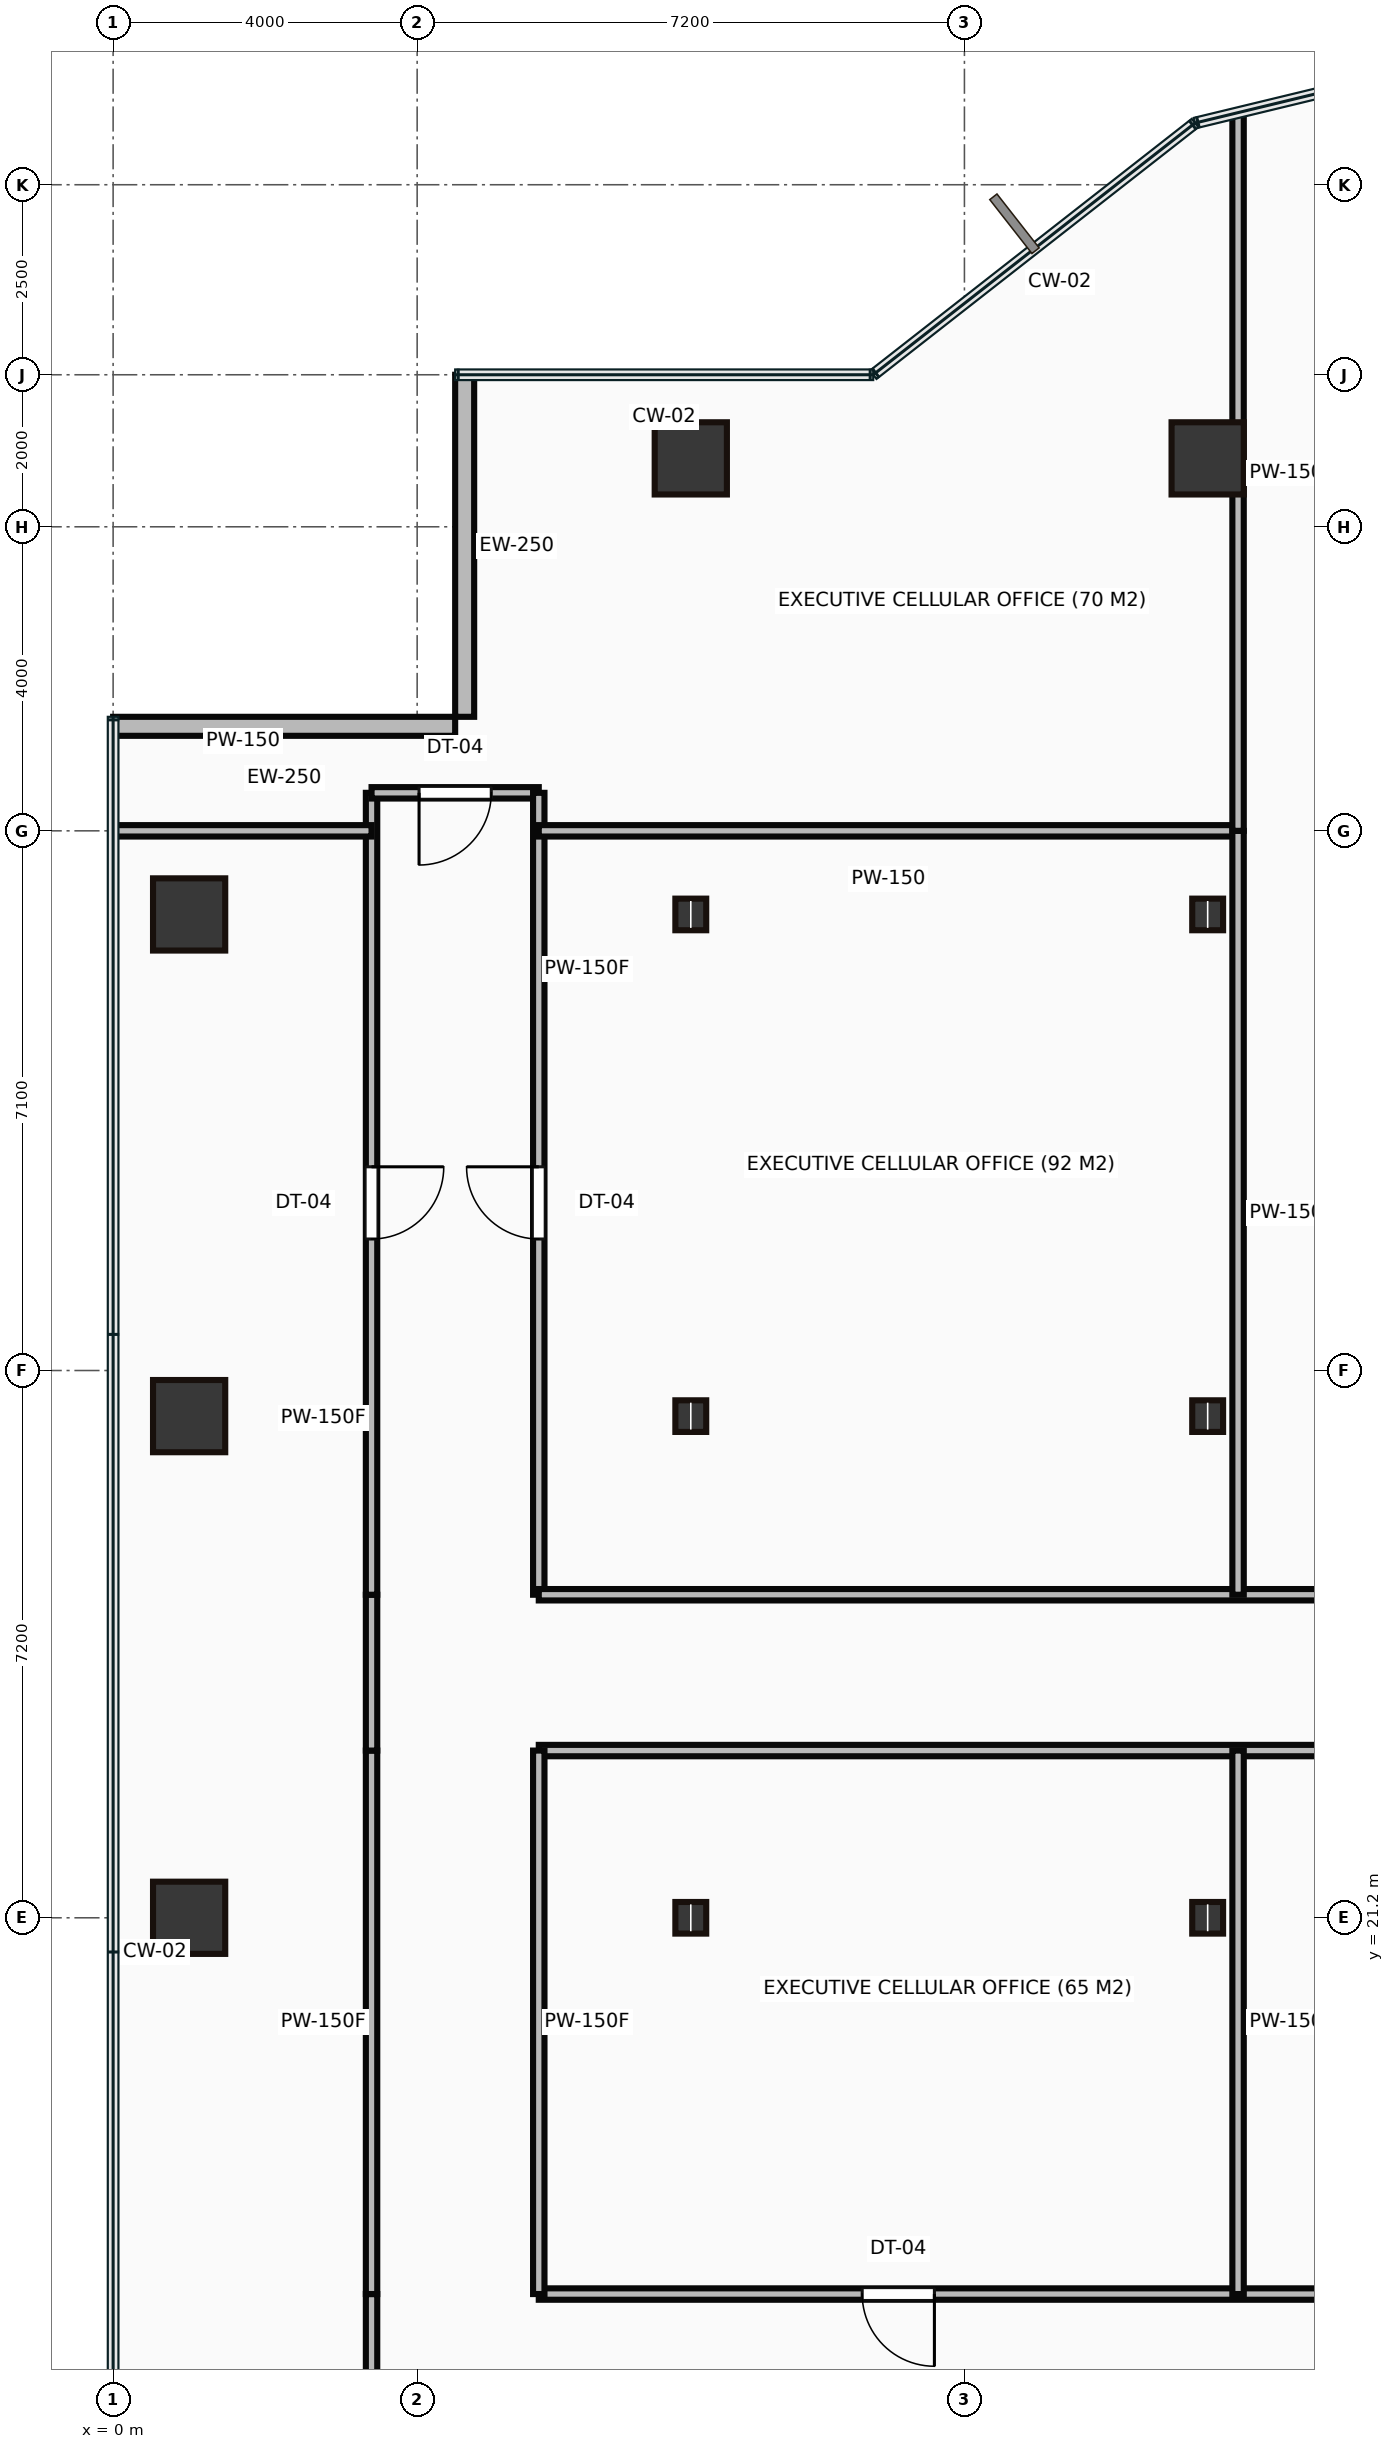
"""IFC4 building model, lengths in metres.
Left out: names, types, materials, properties, quantities, classifications, styles, units other than length and angle.
Written with IfcOpenShell. Run it as: python <this file> out.ifc"""

import sys

from ifc_helpers import new_model, si_unit, direction, frame, frame_2d, origin, origin_2d, place, context, subcontext, project, spatial, rectangle, hollow_rectangle, i_section, extrude, source, transform, mapped, element, fill, save


model = new_model("IFC4")
c1 = context("Model", 3, precision=1e-05, world=origin(), true_north=direction((0.0, 1.0)))
c2 = subcontext(c1, "Body", "Model", "MODEL_VIEW")
j1 = project(units=[si_unit("LENGTHUNIT", "METRE"), si_unit("PLANEANGLEUNIT", "RADIAN")], contexts=[c1])
p1 = place(None, origin())
s1 = spatial("IfcSite", under=j1, at=p1, CompositionType="ELEMENT")
p2 = place(p1, origin())
s2 = spatial("IfcBuilding", under=s1, at=p2, CompositionType="ELEMENT")
p3 = place(p2, frame((0.0, 0.0, 69.0)))
s3 = spatial("IfcBuildingStorey", under=s2, at=p3, CompositionType="ELEMENT", Elevation=69.0)
m1 = source(origin(), c2, "Body", "SweptSolid", [
    extrude(hollow_rectangle(XDim=0.95, YDim=0.95, WallThickness=0.045, at=origin_2d()), origin(), (0.0, 0.0, 1.0), 3.65),
])
for number, where, z_axis, x_axis in (
    (1, (1.0, 21.2, 0.0), (0.0, 0.0, 1.0), (1.0, 0.0, 0.0)),
    (2, (1.0, 27.8, 0.0), (0.0, 0.0, 1.0), (1.0, 0.0, 0.0)),
    (3, (1.0, 34.4, 0.0), (0.0, 0.0, 1.0), (1.0, 0.0, 0.0)),
):
    element("IfcColumn", number, at=place(p3, frame(where, z_axis=z_axis, x_axis=x_axis)), inside=s3, PredefinedType="COLUMN", context=c2, shape_type="MappedRepresentation", body=[
        mapped(m1, transform((0.0, 0.0, 0.0))),
    ])
m2 = source(origin(), c2, "Body", "SweptSolid", [
    extrude(i_section(OverallWidth=0.406, OverallDepth=0.416, WebThickness=0.03, FlangeThickness=0.048, at=origin_2d()), origin(), (0.0, 0.0, 1.0), 3.65),
])
for number, where, z_axis, x_axis in (
    (4, (7.6, 21.2, 0.0), (0.0, 0.0, 1.0), (1.0, 0.0, 0.0)),
    (5, (7.6, 27.8, 0.0), (0.0, 0.0, 1.0), (1.0, 0.0, 0.0)),
    (6, (7.6, 34.4, 0.0), (0.0, 0.0, 1.0), (1.0, 0.0, 0.0)),
):
    element("IfcColumn", number, at=place(p3, frame(where, z_axis=z_axis, x_axis=x_axis)), inside=s3, PredefinedType="COLUMN", context=c2, shape_type="MappedRepresentation", body=[
        mapped(m2, transform((0.0, 0.0, 0.0))),
    ])
p4 = place(p3, frame((7.6, 40.4, 0.0), z_axis=(0.0, 0.0, 1.0), x_axis=(1.0, 0.0, 0.0)))
e7 = element("IfcColumn", 7, at=p4, inside=s3, PredefinedType="COLUMN", context=c2, shape_type="MappedRepresentation", body=[
    mapped(m1, transform((0.0, 0.0, 0.0))),
])
for number, where, z_axis, x_axis in (
    (8, (14.4, 21.2, 0.0), (0.0, 0.0, 1.0), (1.0, 0.0, 0.0)),
    (9, (14.4, 27.8, 0.0), (0.0, 0.0, 1.0), (1.0, 0.0, 0.0)),
    (10, (14.4, 34.4, 0.0), (0.0, 0.0, 1.0), (1.0, 0.0, 0.0)),
):
    element("IfcColumn", number, at=place(p3, frame(where, z_axis=z_axis, x_axis=x_axis)), inside=s3, PredefinedType="COLUMN", context=c2, shape_type="MappedRepresentation", body=[
        mapped(m2, transform((0.0, 0.0, 0.0))),
    ])
p5 = place(p3, frame((14.4, 40.4, 0.0), z_axis=(0.0, 0.0, 1.0), x_axis=(1.0, 0.0, 0.0)))
e11 = element("IfcColumn", 11, at=p5, inside=s3, PredefinedType="COLUMN", context=c2, shape_type="MappedRepresentation", body=[
    mapped(m1, transform((0.0, 0.0, 0.0))),
])
m3 = source(origin(), c2, "Body", "SweptSolid", [
    extrude(rectangle(XDim=4.5, YDim=0.25, at=frame_2d((2.25, 0.0))), origin(), (0.0, 0.0, 1.0), 3.4),
])
for number, where, z_axis, x_axis in (
    (12, (4.625, 41.5, 0.0), (0.0, 0.0, 1.0), (0.0, -1.0, 0.0)),
    (13, (4.5, 36.875, 0.0), (0.0, 0.0, 1.0), (-1.0, 0.0, 0.0)),
):
    element("IfcWall", number, at=place(p3, frame(where, z_axis=z_axis, x_axis=x_axis)), inside=s3, PredefinedType="STANDARD", context=c2, shape_type="MappedRepresentation", body=[
        mapped(m3, transform((0.0, 0.0, 0.0))),
    ])
m4 = source(origin(), c2, "Body", "SweptSolid", [
    extrude(rectangle(XDim=2.25, YDim=0.15, at=frame_2d((1.125, 0.0))), origin(), (0.0, 0.0, 1.0), 3.4),
])
p6 = place(p3, frame((3.4, 14.0, 0.0), z_axis=(0.0, 0.0, 1.0), x_axis=(0.0, 1.0, 0.0)))
e14 = element("IfcWall", 14, at=p6, inside=s3, PredefinedType="PARTITIONING", context=c2, shape_type="MappedRepresentation", body=[
    mapped(m4, transform((0.0, 0.0, 0.0))),
])
m5 = source(origin(), c2, "Body", "SweptSolid", [
    extrude(rectangle(XDim=7.15, YDim=0.15, at=frame_2d((3.575, 0.0))), origin(), (0.0, 0.0, 1.0), 3.4),
])
p7 = place(p3, frame((3.4, 16.25, 0.0), z_axis=(0.0, 0.0, 1.0), x_axis=(0.0, 1.0, 0.0)))
e15 = element("IfcWall", 15, at=p7, inside=s3, PredefinedType="PARTITIONING", context=c2, shape_type="MappedRepresentation", body=[
    mapped(m5, transform((0.0, 0.0, 0.0))),
])
m6 = source(origin(), c2, "Body", "SweptSolid", [
    extrude(rectangle(XDim=2.05, YDim=0.15, at=frame_2d((1.025, 0.0))), origin(), (0.0, 0.0, 1.0), 3.4),
])
p8 = place(p3, frame((3.4, 23.4, 0.0), z_axis=(0.0, 0.0, 1.0), x_axis=(0.0, 1.0, 0.0)))
e16 = element("IfcWall", 16, at=p8, inside=s3, PredefinedType="PARTITIONING", context=c2, shape_type="MappedRepresentation", body=[
    mapped(m6, transform((0.0, 0.0, 0.0))),
])
m7 = source(origin(), c2, "Body", "SweptSolid", [
    extrude(rectangle(XDim=10.55, YDim=0.15, at=frame_2d((5.275, 0.0))), origin(), (0.0, 0.0, 1.0), 3.4),
])
p9 = place(p3, frame((3.4, 25.45, 0.0), z_axis=(0.0, 0.0, 1.0), x_axis=(0.0, 1.0, 0.0)))
e17 = element("IfcWall", 17, at=p9, inside=s3, PredefinedType="PARTITIONING", context=c2, shape_type="MappedRepresentation", body=[
    mapped(m7, transform((0.0, 0.0, 0.0))),
])
p10 = place(p9, frame((4.68, 0.0, 0.0)))
e18 = element("IfcOpeningElement", 18, at=p10, cuts=e17, PredefinedType="OPENING", context=c2, shape_type="SweptSolid", body=[
    extrude(rectangle(XDim=0.95, YDim=2.15, at=frame_2d((0.475, 1.075))), frame((0.0, 0.085, 0.0), z_axis=(0.0, -1.0, 0.0), x_axis=(1.0, 0.0, 0.0)), (0.0, 0.0, 1.0), 0.17),
])
m8 = source(origin(), c2, "Body", "SweptSolid", [
    extrude(rectangle(XDim=2.2, YDim=0.15, at=frame_2d((1.1, 0.0))), origin(), (0.0, 0.0, 1.0), 3.4),
])
p11 = place(p3, frame((3.4, 36.0, 0.0), z_axis=(0.0, 0.0, 1.0), x_axis=(1.0, 0.0, 0.0)))
e19 = element("IfcWall", 19, at=p11, inside=s3, PredefinedType="PARTITIONING", context=c2, shape_type="MappedRepresentation", body=[
    mapped(m8, transform((0.0, 0.0, 0.0))),
])
p12 = place(p11, frame((0.625, 0.0, 0.0)))
e20 = element("IfcOpeningElement", 20, at=p12, cuts=e19, PredefinedType="OPENING", context=c2, shape_type="SweptSolid", body=[
    extrude(rectangle(XDim=0.95, YDim=2.15, at=frame_2d((0.475, 1.075))), frame((0.0, 0.085, 0.0), z_axis=(0.0, -1.0, 0.0), x_axis=(1.0, 0.0, 0.0)), (0.0, 0.0, 1.0), 0.17),
])
p13 = place(p3, frame((5.6, 36.0, 0.0), z_axis=(0.0, 0.0, 1.0), x_axis=(0.0, -1.0, 0.0)))
e21 = element("IfcWall", 21, at=p13, inside=s3, PredefinedType="PARTITIONING", context=c2, shape_type="MappedRepresentation", body=[
    mapped(m7, transform((0.0, 0.0, 0.0))),
])
p14 = place(p13, frame((4.92, 0.0, 0.0)))
e22 = element("IfcOpeningElement", 22, at=p14, cuts=e21, PredefinedType="OPENING", context=c2, shape_type="SweptSolid", body=[
    extrude(rectangle(XDim=0.95, YDim=2.15, at=frame_2d((0.475, 1.075))), frame((0.0, 0.085, 0.0), z_axis=(0.0, -1.0, 0.0), x_axis=(1.0, 0.0, 0.0)), (0.0, 0.0, 1.0), 0.17),
])
m9 = source(origin(), c2, "Body", "SweptSolid", [
    extrude(rectangle(XDim=38.8, YDim=0.15, at=frame_2d((19.4, 0.0))), origin(), (0.0, 0.0, 1.0), 3.4),
])
p15 = place(p3, frame((5.6, 25.45, 0.0), z_axis=(0.0, 0.0, 1.0), x_axis=(1.0, 0.0, 0.0)))
e23 = element("IfcWall", 23, at=p15, inside=s3, PredefinedType="PARTITIONING", context=c2, shape_type="MappedRepresentation", body=[
    mapped(m9, transform((0.0, 0.0, 0.0))),
])
p16 = place(p15, frame((14.125, 0.0, 0.0)))
e24 = element("IfcOpeningElement", 24, at=p16, cuts=e23, PredefinedType="OPENING", context=c2, shape_type="SweptSolid", body=[
    extrude(rectangle(XDim=0.95, YDim=2.15, at=frame_2d((0.475, 1.075))), frame((0.0, 0.085, 0.0), z_axis=(0.0, -1.0, 0.0), x_axis=(1.0, 0.0, 0.0)), (0.0, 0.0, 1.0), 0.17),
])
p17 = place(p15, frame((24.925, 0.0, 0.0)))
e25 = element("IfcOpeningElement", 25, at=p17, cuts=e23, PredefinedType="OPENING", context=c2, shape_type="SweptSolid", body=[
    extrude(rectangle(XDim=0.95, YDim=2.15, at=frame_2d((0.475, 1.075))), frame((0.0, 0.085, 0.0), z_axis=(0.0, -1.0, 0.0), x_axis=(1.0, 0.0, 0.0)), (0.0, 0.0, 1.0), 0.17),
])
p18 = place(p3, frame((5.6, 16.25, 0.0), z_axis=(0.0, 0.0, 1.0), x_axis=(1.0, 0.0, 0.0)))
e26 = element("IfcWall", 26, at=p18, inside=s3, PredefinedType="PARTITIONING", context=c2, shape_type="MappedRepresentation", body=[
    mapped(m9, transform((0.0, 0.0, 0.0))),
])
p19 = place(p18, frame((4.255, 0.0, 0.0)))
e27 = element("IfcOpeningElement", 27, at=p19, cuts=e26, PredefinedType="OPENING", context=c2, shape_type="SweptSolid", body=[
    extrude(rectangle(XDim=0.95, YDim=2.15, at=frame_2d((0.475, 1.075))), frame((0.0, 0.085, 0.0), z_axis=(0.0, -1.0, 0.0), x_axis=(1.0, 0.0, 0.0)), (0.0, 0.0, 1.0), 0.17),
])
p20 = place(p18, frame((14.125, 0.0, 0.0)))
e28 = element("IfcOpeningElement", 28, at=p20, cuts=e26, PredefinedType="OPENING", context=c2, shape_type="SweptSolid", body=[
    extrude(rectangle(XDim=0.95, YDim=2.15, at=frame_2d((0.475, 1.075))), frame((0.0, 0.085, 0.0), z_axis=(0.0, -1.0, 0.0), x_axis=(1.0, 0.0, 0.0)), (0.0, 0.0, 1.0), 0.17),
])
m10 = source(origin(), c2, "Body", "SweptSolid", [
    extrude(rectangle(XDim=38.8, YDim=0.15, at=frame_2d((19.4, 0.0))), origin(), (0.0, 0.0, 1.0), 2.978),
])
p21 = place(p3, frame((44.4, 23.4, 0.0), z_axis=(0.0, 0.0, 1.0), x_axis=(-1.0, 0.0, 0.0)))
e29 = element("IfcWall", 29, at=p21, inside=s3, PredefinedType="PARTITIONING", context=c2, shape_type="MappedRepresentation", body=[
    mapped(m10, transform((0.0, 0.0, 0.0))),
])
p22 = place(p21, frame((12.925, 0.0, 0.0)))
e30 = element("IfcOpeningElement", 30, at=p22, cuts=e29, PredefinedType="OPENING", context=c2, shape_type="SweptSolid", body=[
    extrude(rectangle(XDim=0.95, YDim=2.15, at=frame_2d((0.475, 1.075))), frame((0.0, 0.085, 0.0), z_axis=(0.0, -1.0, 0.0), x_axis=(1.0, 0.0, 0.0)), (0.0, 0.0, 1.0), 0.17),
])
p23 = place(p21, frame((3.655, 0.0, 0.0)))
e31 = element("IfcOpeningElement", 31, at=p23, cuts=e29, PredefinedType="OPENING", context=c2, shape_type="SweptSolid", body=[
    extrude(rectangle(XDim=0.95, YDim=2.15, at=frame_2d((0.475, 1.075))), frame((0.0, 0.085, 0.0), z_axis=(0.0, -1.0, 0.0), x_axis=(1.0, 0.0, 0.0)), (0.0, 0.0, 1.0), 0.17),
])
p24 = place(p3, frame((5.6, 23.4, 0.0), z_axis=(0.0, 0.0, 1.0), x_axis=(0.0, -1.0, 0.0)))
e32 = element("IfcWall", 32, at=p24, inside=s3, PredefinedType="PARTITIONING", context=c2, shape_type="MappedRepresentation", body=[
    mapped(m5, transform((0.0, 0.0, 0.0))),
])
m11 = source(origin(), c2, "Body", "SweptSolid", [
    extrude(rectangle(XDim=3.38, YDim=0.15, at=frame_2d((1.69, 0.0))), origin(), (0.0, 0.0, 1.0), 3.4),
])
p25 = place(p3, frame((0.02, 35.5, 0.0), z_axis=(0.0, 0.0, 1.0), x_axis=(1.0, 0.0, 0.0)))
e33 = element("IfcWall", 33, at=p25, inside=s3, PredefinedType="PARTITIONING", context=c2, shape_type="MappedRepresentation", body=[
    mapped(m11, transform((0.0, 0.0, 0.0))),
])
m12 = source(origin(), c2, "Body", "SweptSolid", [
    extrude(rectangle(XDim=9.2, YDim=0.15, at=frame_2d((4.6, 0.0))), origin(), (0.0, 0.0, 1.0), 3.4),
])
p26 = place(p3, frame((14.8, 35.5, 0.0), z_axis=(0.0, 0.0, 1.0), x_axis=(-1.0, 0.0, 0.0)))
e34 = element("IfcWall", 34, at=p26, inside=s3, PredefinedType="PARTITIONING", context=c2, shape_type="MappedRepresentation", body=[
    mapped(m12, transform((0.0, 0.0, 0.0))),
])
p27 = place(p3, frame((14.8, 23.4, 0.0), z_axis=(0.0, 0.0, 1.0), x_axis=(0.0, -1.0, 0.0)))
e35 = element("IfcWall", 35, at=p27, inside=s3, PredefinedType="PARTITIONING", context=c2, shape_type="MappedRepresentation", body=[
    mapped(m5, transform((0.0, 0.0, 0.0))),
])
m13 = source(origin(), c2, "Body", "SweptSolid", [
    extrude(rectangle(XDim=10.05, YDim=0.15, at=frame_2d((5.025, 0.0))), origin(), (0.0, 0.0, 1.0), 3.4),
])
p28 = place(p3, frame((14.8, 35.5, 0.0), z_axis=(0.0, 0.0, 1.0), x_axis=(0.0, -1.0, 0.0)))
e36 = element("IfcWall", 36, at=p28, inside=s3, PredefinedType="PARTITIONING", context=c2, shape_type="MappedRepresentation", body=[
    mapped(m13, transform((0.0, 0.0, 0.0))),
])
m14 = source(origin(), c2, "Body", "SweptSolid", [
    extrude(rectangle(XDim=9.428, YDim=0.15, at=frame_2d((4.714, 0.0))), origin(), (0.0, 0.0, 1.0), 3.4),
])
p29 = place(p3, frame((14.8, 44.928, 0.0), z_axis=(0.0, 0.0, 1.0), x_axis=(0.0, -1.0, 0.0)))
e37 = element("IfcWall", 37, at=p29, inside=s3, PredefinedType="PARTITIONING", context=c2, shape_type="MappedRepresentation", body=[
    mapped(m14, transform((0.0, 0.0, 0.0))),
])
m15 = source(origin(), c2, "Body", "SweptSolid", [
    extrude(rectangle(XDim=0.95, YDim=2.15, at=frame_2d((0.475, 1.075))), frame((0.0, 0.025, 0.0), z_axis=(0.0, -1.0, 0.0), x_axis=(1.0, 0.0, 0.0)), (0.0, 0.0, 1.0), 0.05),
])
p30 = place(p10, origin())
e38 = element("IfcDoor", 38, at=p30, inside=s3, OperationType="SINGLE_SWING_RIGHT", PredefinedType="DOOR", context=c2, shape_type="MappedRepresentation", body=[
    mapped(m15, transform((0.0, 0.0, 0.0))),
])
fill(e18, e38)
p31 = place(p12, origin())
e39 = element("IfcDoor", 39, at=p31, inside=s3, OperationType="SINGLE_SWING_LEFT", PredefinedType="DOOR", context=c2, shape_type="MappedRepresentation", body=[
    mapped(m15, transform((0.0, 0.0, 0.0))),
])
fill(e20, e39)
p32 = place(p19, origin())
e40 = element("IfcDoor", 40, at=p32, inside=s3, OperationType="SINGLE_SWING_RIGHT", PredefinedType="DOOR", context=c2, shape_type="MappedRepresentation", body=[
    mapped(m15, transform((0.0, 0.0, 0.0))),
])
fill(e27, e40)
p33 = place(p14, origin())
e41 = element("IfcDoor", 41, at=p33, inside=s3, OperationType="SINGLE_SWING_LEFT", PredefinedType="DOOR", context=c2, shape_type="MappedRepresentation", body=[
    mapped(m15, transform((0.0, 0.0, 0.0))),
])
fill(e22, e41)
save(model, sys.argv[1])
